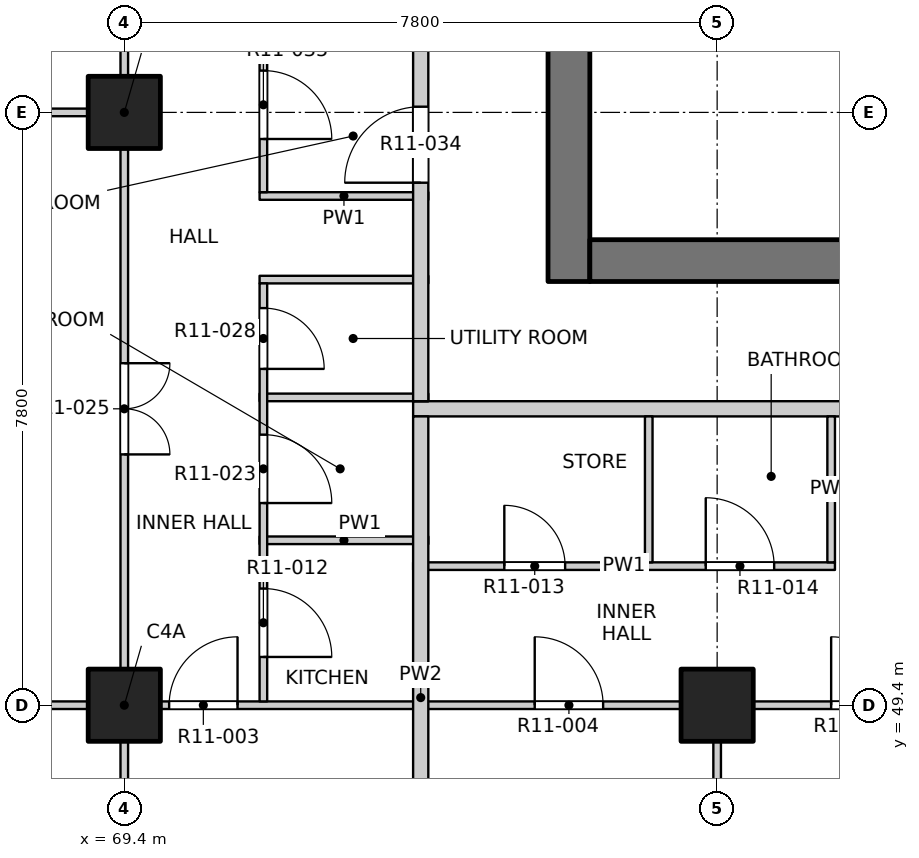
"""IFC4 building model, lengths in metres.
Left out: names, types, materials, properties, quantities, classifications, styles, units other than length and angle.
Written with IfcOpenShell. Run it as: python <this file> out.ifc"""

import sys

from ifc_helpers import new_model, si_unit, direction, frame, frame_2d, origin, origin_2d, place, context, subcontext, project, spatial, rectangle, extrude, element, fill, save


model = new_model("IFC4")
c1 = context("Model", 3, precision=1e-05, world=origin(), true_north=direction((0.0, 1.0)))
c2 = subcontext(c1, "Body", "Model", "MODEL_VIEW")
j1 = project(units=[si_unit("LENGTHUNIT", "METRE"), si_unit("PLANEANGLEUNIT", "RADIAN")], contexts=[c1])
p1 = place(None, origin())
s1 = spatial("IfcSite", under=j1, at=p1, CompositionType="ELEMENT")
p2 = place(p1, origin())
s2 = spatial("IfcBuilding", under=s1, at=p2, CompositionType="ELEMENT")
p3 = place(p2, frame((0.0, 0.0, 130.5)))
s3 = spatial("IfcBuildingStorey", under=s2, at=p3, CompositionType="ELEMENT", Elevation=130.5)
for number, where, z_axis, x_axis in (
    (1, (69.4, 49.4, -0.25), (0.0, 0.0, 1.0), (1.0, 0.0, 0.0)),
    (2, (69.4, 57.2, -0.25), (0.0, 0.0, 1.0), (1.0, 0.0, 0.0)),
    (3, (77.2, 49.4, -0.25), (0.0, 0.0, 1.0), (1.0, 0.0, 0.0)),
):
    element("IfcColumn", number, at=place(p3, frame(where, z_axis=z_axis, x_axis=x_axis)), inside=s3, PredefinedType="COLUMN", context=c2, shape_type="SweptSolid", body=[
        extrude(rectangle(XDim=0.95, YDim=0.95, at=origin_2d()), origin(), (0.0, 0.0, 1.0), 3.4),
    ])
p4 = place(p3, frame((75.25, 54.975, -0.25), z_axis=(0.0, 0.0, 1.0), x_axis=(0.0, 1.0, 0.0)))
e4 = element("IfcWall", 4, at=p4, inside=s3, PredefinedType="SOLIDWALL", context=c2, shape_type="SweptSolid", body=[
    extrude(rectangle(XDim=22.325, YDim=0.55, at=frame_2d((11.163, 0.0))), origin(), (0.0, 0.0, 1.0), 3.4),
])
p5 = place(p4, frame((7.475, 0.0, 0.25)))
e5 = element("IfcOpeningElement", 5, at=p5, cuts=e4, PredefinedType="OPENING", context=c2, shape_type="SweptSolid", body=[
    extrude(rectangle(XDim=0.9, YDim=2.1, at=frame_2d((0.45, 1.05))), frame((0.0, 0.285, 0.0), z_axis=(0.0, -1.0, 0.0), x_axis=(1.0, 0.0, 0.0)), (0.0, 0.0, 1.0), 0.57),
])
p6 = place(p4, frame((12.125, 0.0, 0.25)))
e6 = element("IfcOpeningElement", 6, at=p6, cuts=e4, PredefinedType="OPENING", context=c2, shape_type="SweptSolid", body=[
    extrude(rectangle(XDim=0.9, YDim=2.1, at=frame_2d((0.45, 1.05))), frame((0.0, 0.285, 0.0), z_axis=(0.0, -1.0, 0.0), x_axis=(1.0, 0.0, 0.0)), (0.0, 0.0, 1.0), 0.57),
])
p7 = place(p4, frame((16.625, 0.0, 0.25)))
e7 = element("IfcOpeningElement", 7, at=p7, cuts=e4, PredefinedType="OPENING", context=c2, shape_type="SweptSolid", body=[
    extrude(rectangle(XDim=0.9, YDim=2.1, at=frame_2d((0.45, 1.05))), frame((0.0, 0.285, 0.0), z_axis=(0.0, -1.0, 0.0), x_axis=(1.0, 0.0, 0.0)), (0.0, 0.0, 1.0), 0.57),
])
p8 = place(p4, frame((20.075, 0.0, 0.25)))
e8 = element("IfcOpeningElement", 8, at=p8, cuts=e4, PredefinedType="OPENING", context=c2, shape_type="SweptSolid", body=[
    extrude(rectangle(XDim=0.9, YDim=2.1, at=frame_2d((0.45, 1.05))), frame((0.0, 0.285, 0.0), z_axis=(0.0, -1.0, 0.0), x_axis=(1.0, 0.0, 0.0)), (0.0, 0.0, 1.0), 0.57),
])
p9 = place(p3, frame((75.525, 55.25, -0.25), z_axis=(0.0, 0.0, 1.0), x_axis=(1.0, 0.0, 0.0)))
e9 = element("IfcWall", 9, at=p9, inside=s3, PredefinedType="SOLIDWALL", context=c2, shape_type="SweptSolid", body=[
    extrude(rectangle(XDim=18.95, YDim=0.55, at=frame_2d((9.475, 0.0))), origin(), (0.0, 0.0, 1.0), 3.4),
])
p10 = place(p9, frame((8.725, 0.0, 0.25)))
e10 = element("IfcOpeningElement", 10, at=p10, cuts=e9, PredefinedType="OPENING", context=c2, shape_type="SweptSolid", body=[
    extrude(rectangle(XDim=1.5, YDim=2.1, at=frame_2d((0.75, 1.05))), frame((0.0, 0.285, 0.0), z_axis=(0.0, -1.0, 0.0), x_axis=(1.0, 0.0, 0.0)), (0.0, 0.0, 1.0), 0.57),
])
p11 = place(p3, frame((65.8, 49.4, 0.0), z_axis=(0.0, 0.0, 1.0), x_axis=(1.0, 0.0, 0.0)))
e11 = element("IfcWall", 11, at=p11, inside=s3, PredefinedType="PARTITIONING", context=c2, shape_type="SweptSolid", body=[
    extrude(rectangle(XDim=38.4, YDim=0.1, at=frame_2d((19.2, 0.0))), origin(), (0.0, 0.0, 1.0), 3.15),
])
p12 = place(p11, frame((4.19, 0.0, 0.0)))
e12 = element("IfcOpeningElement", 12, at=p12, cuts=e11, PredefinedType="OPENING", context=c2, shape_type="SweptSolid", body=[
    extrude(rectangle(XDim=0.9, YDim=2.1, at=frame_2d((0.45, 1.05))), frame((0.0, 0.06, 0.0), z_axis=(0.0, -1.0, 0.0), x_axis=(1.0, 0.0, 0.0)), (0.0, 0.0, 1.0), 0.12),
])
p13 = place(p11, frame((9.0, 0.0, 0.0)))
e13 = element("IfcOpeningElement", 13, at=p13, cuts=e11, PredefinedType="OPENING", context=c2, shape_type="SweptSolid", body=[
    extrude(rectangle(XDim=0.9, YDim=2.1, at=frame_2d((0.45, 1.05))), frame((0.0, 0.06, 0.0), z_axis=(0.0, -1.0, 0.0), x_axis=(1.0, 0.0, 0.0)), (0.0, 0.0, 1.0), 0.12),
])
p14 = place(p11, frame((12.9, 0.0, 0.0)))
e14 = element("IfcOpeningElement", 14, at=p14, cuts=e11, PredefinedType="OPENING", context=c2, shape_type="SweptSolid", body=[
    extrude(rectangle(XDim=0.9, YDim=2.1, at=frame_2d((0.45, 1.05))), frame((0.0, 0.06, 0.0), z_axis=(0.0, -1.0, 0.0), x_axis=(1.0, 0.0, 0.0)), (0.0, 0.0, 1.0), 0.12),
])
p15 = place(p11, frame((16.8, 0.0, 0.0)))
e15 = element("IfcOpeningElement", 15, at=p15, cuts=e11, PredefinedType="OPENING", context=c2, shape_type="SweptSolid", body=[
    extrude(rectangle(XDim=0.9, YDim=2.1, at=frame_2d((0.45, 1.05))), frame((0.0, 0.06, 0.0), z_axis=(0.0, -1.0, 0.0), x_axis=(1.0, 0.0, 0.0)), (0.0, 0.0, 1.0), 0.12),
])
p16 = place(p11, frame((20.7, 0.0, 0.0)))
e16 = element("IfcOpeningElement", 16, at=p16, cuts=e11, PredefinedType="OPENING", context=c2, shape_type="SweptSolid", body=[
    extrude(rectangle(XDim=0.9, YDim=2.1, at=frame_2d((0.45, 1.05))), frame((0.0, 0.06, 0.0), z_axis=(0.0, -1.0, 0.0), x_axis=(1.0, 0.0, 0.0)), (0.0, 0.0, 1.0), 0.12),
])
p17 = place(p11, frame((24.6, 0.0, 0.0)))
e17 = element("IfcOpeningElement", 17, at=p17, cuts=e11, PredefinedType="OPENING", context=c2, shape_type="SweptSolid", body=[
    extrude(rectangle(XDim=0.9, YDim=2.1, at=frame_2d((0.45, 1.05))), frame((0.0, 0.06, 0.0), z_axis=(0.0, -1.0, 0.0), x_axis=(1.0, 0.0, 0.0)), (0.0, 0.0, 1.0), 0.12),
])
p18 = place(p11, frame((28.5, 0.0, 0.0)))
e18 = element("IfcOpeningElement", 18, at=p18, cuts=e11, PredefinedType="OPENING", context=c2, shape_type="SweptSolid", body=[
    extrude(rectangle(XDim=0.9, YDim=2.1, at=frame_2d((0.45, 1.05))), frame((0.0, 0.06, 0.0), z_axis=(0.0, -1.0, 0.0), x_axis=(1.0, 0.0, 0.0)), (0.0, 0.0, 1.0), 0.12),
])
p19 = place(p11, frame((33.31, 0.0, 0.0)))
e19 = element("IfcOpeningElement", 19, at=p19, cuts=e11, PredefinedType="OPENING", context=c2, shape_type="SweptSolid", body=[
    extrude(rectangle(XDim=0.9, YDim=2.1, at=frame_2d((0.45, 1.05))), frame((0.0, 0.06, 0.0), z_axis=(0.0, -1.0, 0.0), x_axis=(1.0, 0.0, 0.0)), (0.0, 0.0, 1.0), 0.12),
])
p20 = place(p3, frame((73.2, 51.23, 0.0), z_axis=(0.0, 0.0, 1.0), x_axis=(1.0, 0.0, 0.0)))
e20 = element("IfcWall", 20, at=p20, inside=s3, PredefinedType="PARTITIONING", context=c2, shape_type="SweptSolid", body=[
    extrude(rectangle(XDim=5.55, YDim=0.1, at=frame_2d((2.775, 0.0))), origin(), (0.0, 0.0, 1.0), 3.15),
])
p21 = place(p20, frame((1.2, 0.0, 0.0)))
e21 = element("IfcOpeningElement", 21, at=p21, cuts=e20, PredefinedType="OPENING", context=c2, shape_type="SweptSolid", body=[
    extrude(rectangle(XDim=0.8, YDim=2.1, at=frame_2d((0.4, 1.05))), frame((0.0, 0.06, 0.0), z_axis=(0.0, -1.0, 0.0), x_axis=(1.0, 0.0, 0.0)), (0.0, 0.0, 1.0), 0.12),
])
p22 = place(p20, frame((3.85, 0.0, 0.0)))
e22 = element("IfcOpeningElement", 22, at=p22, cuts=e20, PredefinedType="OPENING", context=c2, shape_type="SweptSolid", body=[
    extrude(rectangle(XDim=0.9, YDim=2.1, at=frame_2d((0.45, 1.05))), frame((0.0, 0.06, 0.0), z_axis=(0.0, -1.0, 0.0), x_axis=(1.0, 0.0, 0.0)), (0.0, 0.0, 1.0), 0.12),
])
p23 = place(p3, frame((71.18, 51.57, 0.0), z_axis=(0.0, 0.0, 1.0), x_axis=(1.0, 0.0, 0.0)))
e23 = element("IfcWall", 23, at=p23, inside=s3, PredefinedType="PARTITIONING", context=c2, shape_type="SweptSolid", body=[
    extrude(rectangle(XDim=2.22, YDim=0.1, at=frame_2d((1.11, 0.0))), origin(), (0.0, 0.0, 1.0), 3.15),
])
p24 = place(p3, frame((73.2, 53.3, 0.0), z_axis=(0.0, 0.0, 1.0), x_axis=(1.0, 0.0, 0.0)))
e24 = element("IfcWall", 24, at=p24, inside=s3, PredefinedType="PARTITIONING", context=c2, shape_type="SweptSolid", body=[
    extrude(rectangle(XDim=23.6, YDim=0.2, at=frame_2d((11.8, 0.0))), origin(), (0.0, 0.0, 1.0), 3.15),
])
p25 = place(p24, frame((6.775, 0.0, 0.0)))
e25 = element("IfcOpeningElement", 25, at=p25, cuts=e24, PredefinedType="OPENING", context=c2, shape_type="SweptSolid", body=[
    extrude(rectangle(XDim=1.0, YDim=2.1, at=frame_2d((0.5, 1.05))), frame((0.0, 0.11, 0.0), z_axis=(0.0, -1.0, 0.0), x_axis=(1.0, 0.0, 0.0)), (0.0, 0.0, 1.0), 0.22),
])
p26 = place(p24, frame((21.825, 0.0, 0.0)))
e26 = element("IfcOpeningElement", 26, at=p26, cuts=e24, PredefinedType="OPENING", context=c2, shape_type="SweptSolid", body=[
    extrude(rectangle(XDim=1.0, YDim=2.1, at=frame_2d((0.5, 1.05))), frame((0.0, 0.11, 0.0), z_axis=(0.0, -1.0, 0.0), x_axis=(1.0, 0.0, 0.0)), (0.0, 0.0, 1.0), 0.22),
])
for number, where, z_axis, x_axis in (
    (27, (71.18, 53.45, 0.0), (0.0, 0.0, 1.0), (1.0, 0.0, 0.0)),
    (28, (71.18, 55.0, 0.0), (0.0, 0.0, 1.0), (1.0, 0.0, 0.0)),
    (29, (71.18, 56.1, 0.0), (0.0, 0.0, 1.0), (1.0, 0.0, 0.0)),
):
    element("IfcWall", number, at=place(p3, frame(where, z_axis=z_axis, x_axis=x_axis)), inside=s3, PredefinedType="PARTITIONING", context=c2, shape_type="SweptSolid", body=[
        extrude(rectangle(XDim=2.22, YDim=0.1, at=frame_2d((1.11, 0.0))), origin(), (0.0, 0.0, 1.0), 3.15),
    ])
p27 = place(p3, frame((65.8, 57.2, 0.0), z_axis=(0.0, 0.0, 1.0), x_axis=(1.0, 0.0, 0.0)))
e30 = element("IfcWall", 30, at=p27, inside=s3, PredefinedType="PARTITIONING", context=c2, shape_type="SweptSolid", body=[
    extrude(rectangle(XDim=3.65, YDim=0.1, at=frame_2d((1.825, 0.0))), origin(), (0.0, 0.0, 1.0), 3.15),
])
p28 = place(p3, frame((69.4, 45.8, 0.0), z_axis=(0.0, 0.0, 1.0), x_axis=(0.0, 1.0, 0.0)))
e31 = element("IfcWall", 31, at=p28, inside=s3, PredefinedType="PARTITIONING", context=c2, shape_type="SweptSolid", body=[
    extrude(rectangle(XDim=38.4, YDim=0.1, at=frame_2d((19.2, 0.0))), origin(), (0.0, 0.0, 1.0), 3.15),
])
p29 = place(p28, frame((1.05, 0.0, 0.0)))
e32 = element("IfcOpeningElement", 32, at=p29, cuts=e31, PredefinedType="OPENING", context=c2, shape_type="SweptSolid", body=[
    extrude(rectangle(XDim=1.2, YDim=2.1, at=frame_2d((0.6, 1.05))), frame((0.0, 0.06, 0.0), z_axis=(0.0, -1.0, 0.0), x_axis=(1.0, 0.0, 0.0)), (0.0, 0.0, 1.0), 0.12),
])
p30 = place(p28, frame((6.9, 0.0, 0.0)))
e33 = element("IfcOpeningElement", 33, at=p30, cuts=e31, PredefinedType="OPENING", context=c2, shape_type="SweptSolid", body=[
    extrude(rectangle(XDim=1.2, YDim=2.1, at=frame_2d((0.6, 1.05))), frame((0.0, 0.06, 0.0), z_axis=(0.0, -1.0, 0.0), x_axis=(1.0, 0.0, 0.0)), (0.0, 0.0, 1.0), 0.12),
])
p31 = place(p28, frame((12.9, 0.0, 0.0)))
e34 = element("IfcOpeningElement", 34, at=p31, cuts=e31, PredefinedType="OPENING", context=c2, shape_type="SweptSolid", body=[
    extrude(rectangle(XDim=0.9, YDim=2.1, at=frame_2d((0.45, 1.05))), frame((0.0, 0.06, 0.0), z_axis=(0.0, -1.0, 0.0), x_axis=(1.0, 0.0, 0.0)), (0.0, 0.0, 1.0), 0.12),
])
p32 = place(p28, frame((19.775, 0.0, 0.0)))
e35 = element("IfcOpeningElement", 35, at=p32, cuts=e31, PredefinedType="OPENING", context=c2, shape_type="SweptSolid", body=[
    extrude(rectangle(XDim=1.2, YDim=2.1, at=frame_2d((0.6, 1.05))), frame((0.0, 0.06, 0.0), z_axis=(0.0, -1.0, 0.0), x_axis=(1.0, 0.0, 0.0)), (0.0, 0.0, 1.0), 0.12),
])
p33 = place(p28, frame((24.6, 0.0, 0.0)))
e36 = element("IfcOpeningElement", 36, at=p33, cuts=e31, PredefinedType="OPENING", context=c2, shape_type="SweptSolid", body=[
    extrude(rectangle(XDim=0.9, YDim=2.1, at=frame_2d((0.45, 1.05))), frame((0.0, 0.06, 0.0), z_axis=(0.0, -1.0, 0.0), x_axis=(1.0, 0.0, 0.0)), (0.0, 0.0, 1.0), 0.12),
])
p34 = place(p28, frame((30.3, 0.0, 0.0)))
e37 = element("IfcOpeningElement", 37, at=p34, cuts=e31, PredefinedType="OPENING", context=c2, shape_type="SweptSolid", body=[
    extrude(rectangle(XDim=1.2, YDim=2.1, at=frame_2d((0.6, 1.05))), frame((0.0, 0.06, 0.0), z_axis=(0.0, -1.0, 0.0), x_axis=(1.0, 0.0, 0.0)), (0.0, 0.0, 1.0), 0.12),
])
p35 = place(p28, frame((36.15, 0.0, 0.0)))
e38 = element("IfcOpeningElement", 38, at=p35, cuts=e31, PredefinedType="OPENING", context=c2, shape_type="SweptSolid", body=[
    extrude(rectangle(XDim=1.2, YDim=2.1, at=frame_2d((0.6, 1.05))), frame((0.0, 0.06, 0.0), z_axis=(0.0, -1.0, 0.0), x_axis=(1.0, 0.0, 0.0)), (0.0, 0.0, 1.0), 0.12),
])
p36 = place(p3, frame((71.23, 49.45, 0.0), z_axis=(0.0, 0.0, 1.0), x_axis=(0.0, 1.0, 0.0)))
e39 = element("IfcWall", 39, at=p36, inside=s3, PredefinedType="PARTITIONING", context=c2, shape_type="SweptSolid", body=[
    extrude(rectangle(XDim=5.5, YDim=0.1, at=frame_2d((2.75, 0.0))), origin(), (0.0, 0.0, 1.0), 3.15),
])
p37 = place(p36, frame((0.585, 0.0, 0.0)))
e40 = element("IfcOpeningElement", 40, at=p37, cuts=e39, PredefinedType="OPENING", context=c2, shape_type="SweptSolid", body=[
    extrude(rectangle(XDim=0.9, YDim=2.1, at=frame_2d((0.45, 1.05))), frame((0.0, 0.06, 0.0), z_axis=(0.0, -1.0, 0.0), x_axis=(1.0, 0.0, 0.0)), (0.0, 0.0, 1.0), 0.12),
])
p38 = place(p36, frame((2.61, 0.0, 0.0)))
e41 = element("IfcOpeningElement", 41, at=p38, cuts=e39, PredefinedType="OPENING", context=c2, shape_type="SweptSolid", body=[
    extrude(rectangle(XDim=0.9, YDim=2.1, at=frame_2d((0.45, 1.05))), frame((0.0, 0.06, 0.0), z_axis=(0.0, -1.0, 0.0), x_axis=(1.0, 0.0, 0.0)), (0.0, 0.0, 1.0), 0.12),
])
p39 = place(p36, frame((4.375, 0.0, 0.0)))
e42 = element("IfcOpeningElement", 42, at=p39, cuts=e39, PredefinedType="OPENING", context=c2, shape_type="SweptSolid", body=[
    extrude(rectangle(XDim=0.8, YDim=2.1, at=frame_2d((0.4, 1.05))), frame((0.0, 0.06, 0.0), z_axis=(0.0, -1.0, 0.0), x_axis=(1.0, 0.0, 0.0)), (0.0, 0.0, 1.0), 0.12),
])
p40 = place(p3, frame((71.23, 56.15, 0.0), z_axis=(0.0, 0.0, 1.0), x_axis=(0.0, 1.0, 0.0)))
e43 = element("IfcWall", 43, at=p40, inside=s3, PredefinedType="PARTITIONING", context=c2, shape_type="SweptSolid", body=[
    extrude(rectangle(XDim=7.15, YDim=0.1, at=frame_2d((3.575, 0.0))), origin(), (0.0, 0.0, 1.0), 3.15),
])
p41 = place(p40, frame((0.7, 0.0, 0.0)))
e44 = element("IfcOpeningElement", 44, at=p41, cuts=e43, PredefinedType="OPENING", context=c2, shape_type="SweptSolid", body=[
    extrude(rectangle(XDim=0.9, YDim=2.1, at=frame_2d((0.45, 1.05))), frame((0.0, 0.06, 0.0), z_axis=(0.0, -1.0, 0.0), x_axis=(1.0, 0.0, 0.0)), (0.0, 0.0, 1.0), 0.12),
])
p42 = place(p40, frame((3.25, 0.0, 0.0)))
e45 = element("IfcOpeningElement", 45, at=p42, cuts=e43, PredefinedType="OPENING", context=c2, shape_type="SweptSolid", body=[
    extrude(rectangle(XDim=0.8, YDim=2.1, at=frame_2d((0.4, 1.05))), frame((0.0, 0.06, 0.0), z_axis=(0.0, -1.0, 0.0), x_axis=(1.0, 0.0, 0.0)), (0.0, 0.0, 1.0), 0.12),
])
p43 = place(p40, frame((5.675, 0.0, 0.0)))
e46 = element("IfcOpeningElement", 46, at=p43, cuts=e43, PredefinedType="OPENING", context=c2, shape_type="SweptSolid", body=[
    extrude(rectangle(XDim=0.8, YDim=2.1, at=frame_2d((0.4, 1.05))), frame((0.0, 0.06, 0.0), z_axis=(0.0, -1.0, 0.0), x_axis=(1.0, 0.0, 0.0)), (0.0, 0.0, 1.0), 0.12),
])
p44 = place(p3, frame((73.3, 45.8, 0.0), z_axis=(0.0, 0.0, 1.0), x_axis=(0.0, 1.0, 0.0)))
e47 = element("IfcWall", 47, at=p44, inside=s3, PredefinedType="PARTITIONING", context=c2, shape_type="SweptSolid", body=[
    extrude(rectangle(XDim=7.4, YDim=0.2, at=frame_2d((3.7, 0.0))), origin(), (0.0, 0.0, 1.0), 3.15),
])
p45 = place(p3, frame((73.3, 53.4, 0.0), z_axis=(0.0, 0.0, 1.0), x_axis=(0.0, 1.0, 0.0)))
e48 = element("IfcWall", 48, at=p45, inside=s3, PredefinedType="PARTITIONING", context=c2, shape_type="SweptSolid", body=[
    extrude(rectangle(XDim=30.8, YDim=0.2, at=frame_2d((15.4, 0.0))), origin(), (0.0, 0.0, 1.0), 3.15),
])
p46 = place(p45, frame((2.875, 0.0, 0.0)))
e49 = element("IfcOpeningElement", 49, at=p46, cuts=e48, PredefinedType="OPENING", context=c2, shape_type="SweptSolid", body=[
    extrude(rectangle(XDim=1.0, YDim=2.1, at=frame_2d((0.5, 1.05))), frame((0.0, 0.11, 0.0), z_axis=(0.0, -1.0, 0.0), x_axis=(1.0, 0.0, 0.0)), (0.0, 0.0, 1.0), 0.22),
])
p47 = place(p45, frame((11.225, 0.0, 0.0)))
e50 = element("IfcOpeningElement", 50, at=p47, cuts=e48, PredefinedType="OPENING", context=c2, shape_type="SweptSolid", body=[
    extrude(rectangle(XDim=1.0, YDim=2.1, at=frame_2d((0.5, 1.05))), frame((0.0, 0.11, 0.0), z_axis=(0.0, -1.0, 0.0), x_axis=(1.0, 0.0, 0.0)), (0.0, 0.0, 1.0), 0.22),
])
p48 = place(p45, frame((25.625, 0.0, 0.0)))
e51 = element("IfcOpeningElement", 51, at=p48, cuts=e48, PredefinedType="OPENING", context=c2, shape_type="SweptSolid", body=[
    extrude(rectangle(XDim=1.0, YDim=2.1, at=frame_2d((0.5, 1.05))), frame((0.0, 0.11, 0.0), z_axis=(0.0, -1.0, 0.0), x_axis=(1.0, 0.0, 0.0)), (0.0, 0.0, 1.0), 0.22),
])
p49 = place(p3, frame((76.3, 51.28, 0.0), z_axis=(0.0, 0.0, 1.0), x_axis=(0.0, 1.0, 0.0)))
e52 = element("IfcWall", 52, at=p49, inside=s3, PredefinedType="PARTITIONING", context=c2, shape_type="SweptSolid", body=[
    extrude(rectangle(XDim=1.92, YDim=0.1, at=frame_2d((0.96, 0.0))), origin(), (0.0, 0.0, 1.0), 3.15),
])
p50 = place(p3, frame((77.2, 45.8, 0.0), z_axis=(0.0, 0.0, 1.0), x_axis=(0.0, 1.0, 0.0)))
e53 = element("IfcWall", 53, at=p50, inside=s3, PredefinedType="PARTITIONING", context=c2, shape_type="SweptSolid", body=[
    extrude(rectangle(XDim=3.55, YDim=0.1, at=frame_2d((1.775, 0.0))), origin(), (0.0, 0.0, 1.0), 3.15),
])
p51 = place(p3, frame((78.7, 51.28, 0.0), z_axis=(0.0, 0.0, 1.0), x_axis=(0.0, 1.0, 0.0)))
e54 = element("IfcWall", 54, at=p51, inside=s3, PredefinedType="PARTITIONING", context=c2, shape_type="SweptSolid", body=[
    extrude(rectangle(XDim=1.92, YDim=0.1, at=frame_2d((0.96, 0.0))), origin(), (0.0, 0.0, 1.0), 3.15),
])
p52 = place(p12, origin())
e55 = element("IfcDoor", 55, at=p52, inside=s3, OperationType="SINGLE_SWING_RIGHT", PredefinedType="DOOR", context=c2, shape_type="SweptSolid", body=[
    extrude(rectangle(XDim=0.9, YDim=2.1, at=frame_2d((0.45, 1.05))), frame((0.0, 0.025, 0.0), z_axis=(0.0, -1.0, 0.0), x_axis=(1.0, 0.0, 0.0)), (0.0, 0.0, 1.0), 0.05),
])
fill(e12, e55)
p53 = place(p13, origin())
e56 = element("IfcDoor", 56, at=p53, inside=s3, OperationType="SINGLE_SWING_LEFT", PredefinedType="DOOR", context=c2, shape_type="SweptSolid", body=[
    extrude(rectangle(XDim=0.9, YDim=2.1, at=frame_2d((0.45, 1.05))), frame((0.0, 0.025, 0.0), z_axis=(0.0, -1.0, 0.0), x_axis=(1.0, 0.0, 0.0)), (0.0, 0.0, 1.0), 0.05),
])
fill(e13, e56)
p54 = place(p14, origin())
e57 = element("IfcDoor", 57, at=p54, inside=s3, OperationType="SINGLE_SWING_LEFT", PredefinedType="DOOR", context=c2, shape_type="SweptSolid", body=[
    extrude(rectangle(XDim=0.9, YDim=2.1, at=frame_2d((0.45, 1.05))), frame((0.0, 0.025, 0.0), z_axis=(0.0, -1.0, 0.0), x_axis=(1.0, 0.0, 0.0)), (0.0, 0.0, 1.0), 0.05),
])
fill(e14, e57)
p55 = place(p37, origin())
e58 = element("IfcDoor", 58, at=p55, inside=s3, OperationType="SINGLE_SWING_RIGHT", PredefinedType="DOOR", context=c2, shape_type="SweptSolid", body=[
    extrude(rectangle(XDim=0.9, YDim=2.1, at=frame_2d((0.45, 1.05))), frame((0.0, 0.025, 0.0), z_axis=(0.0, -1.0, 0.0), x_axis=(1.0, 0.0, 0.0)), (0.0, 0.0, 1.0), 0.05),
])
fill(e40, e58)
p56 = place(p21, origin())
e59 = element("IfcDoor", 59, at=p56, inside=s3, OperationType="SINGLE_SWING_LEFT", PredefinedType="DOOR", context=c2, shape_type="SweptSolid", body=[
    extrude(rectangle(XDim=0.8, YDim=2.1, at=frame_2d((0.4, 1.05))), frame((0.0, 0.025, 0.0), z_axis=(0.0, -1.0, 0.0), x_axis=(1.0, 0.0, 0.0)), (0.0, 0.0, 1.0), 0.05),
])
fill(e21, e59)
p57 = place(p22, origin())
e60 = element("IfcDoor", 60, at=p57, inside=s3, OperationType="SINGLE_SWING_LEFT", PredefinedType="DOOR", context=c2, shape_type="SweptSolid", body=[
    extrude(rectangle(XDim=0.9, YDim=2.1, at=frame_2d((0.45, 1.05))), frame((0.0, 0.025, 0.0), z_axis=(0.0, -1.0, 0.0), x_axis=(1.0, 0.0, 0.0)), (0.0, 0.0, 1.0), 0.05),
])
fill(e22, e60)
p58 = place(p38, origin())
e61 = element("IfcDoor", 61, at=p58, inside=s3, OperationType="SINGLE_SWING_RIGHT", PredefinedType="DOOR", context=c2, shape_type="SweptSolid", body=[
    extrude(rectangle(XDim=0.9, YDim=2.1, at=frame_2d((0.45, 1.05))), frame((0.0, 0.025, 0.0), z_axis=(0.0, -1.0, 0.0), x_axis=(1.0, 0.0, 0.0)), (0.0, 0.0, 1.0), 0.05),
])
fill(e41, e61)
p59 = place(p30, origin())
e62 = element("IfcDoor", 62, at=p59, inside=s3, OperationType="DOUBLE_DOOR_SINGLE_SWING", PredefinedType="DOOR", context=c2, shape_type="SweptSolid", body=[
    extrude(rectangle(XDim=1.2, YDim=2.1, at=frame_2d((0.6, 1.05))), frame((0.0, 0.025, 0.0), z_axis=(0.0, -1.0, 0.0), x_axis=(1.0, 0.0, 0.0)), (0.0, 0.0, 1.0), 0.05),
])
fill(e33, e62)
p60 = place(p39, origin())
e63 = element("IfcDoor", 63, at=p60, inside=s3, OperationType="SINGLE_SWING_RIGHT", PredefinedType="DOOR", context=c2, shape_type="SweptSolid", body=[
    extrude(rectangle(XDim=0.8, YDim=2.1, at=frame_2d((0.4, 1.05))), frame((0.0, 0.025, 0.0), z_axis=(0.0, -1.0, 0.0), x_axis=(1.0, 0.0, 0.0)), (0.0, 0.0, 1.0), 0.05),
])
fill(e42, e63)
p61 = place(p46, origin())
e64 = element("IfcDoor", 64, at=p61, inside=s3, OperationType="SINGLE_SWING_RIGHT", PredefinedType="DOOR", context=c2, shape_type="SweptSolid", body=[
    extrude(rectangle(XDim=1.0, YDim=2.1, at=frame_2d((0.5, 1.05))), frame((0.0, 0.025, 0.0), z_axis=(0.0, -1.0, 0.0), x_axis=(1.0, 0.0, 0.0)), (0.0, 0.0, 1.0), 0.05),
])
fill(e49, e64)
p62 = place(p41, origin())
e65 = element("IfcDoor", 65, at=p62, inside=s3, OperationType="SINGLE_SWING_RIGHT", PredefinedType="DOOR", context=c2, shape_type="SweptSolid", body=[
    extrude(rectangle(XDim=0.9, YDim=2.1, at=frame_2d((0.45, 1.05))), frame((0.0, 0.025, 0.0), z_axis=(0.0, -1.0, 0.0), x_axis=(1.0, 0.0, 0.0)), (0.0, 0.0, 1.0), 0.05),
])
fill(e44, e65)
save(model, sys.argv[1])
